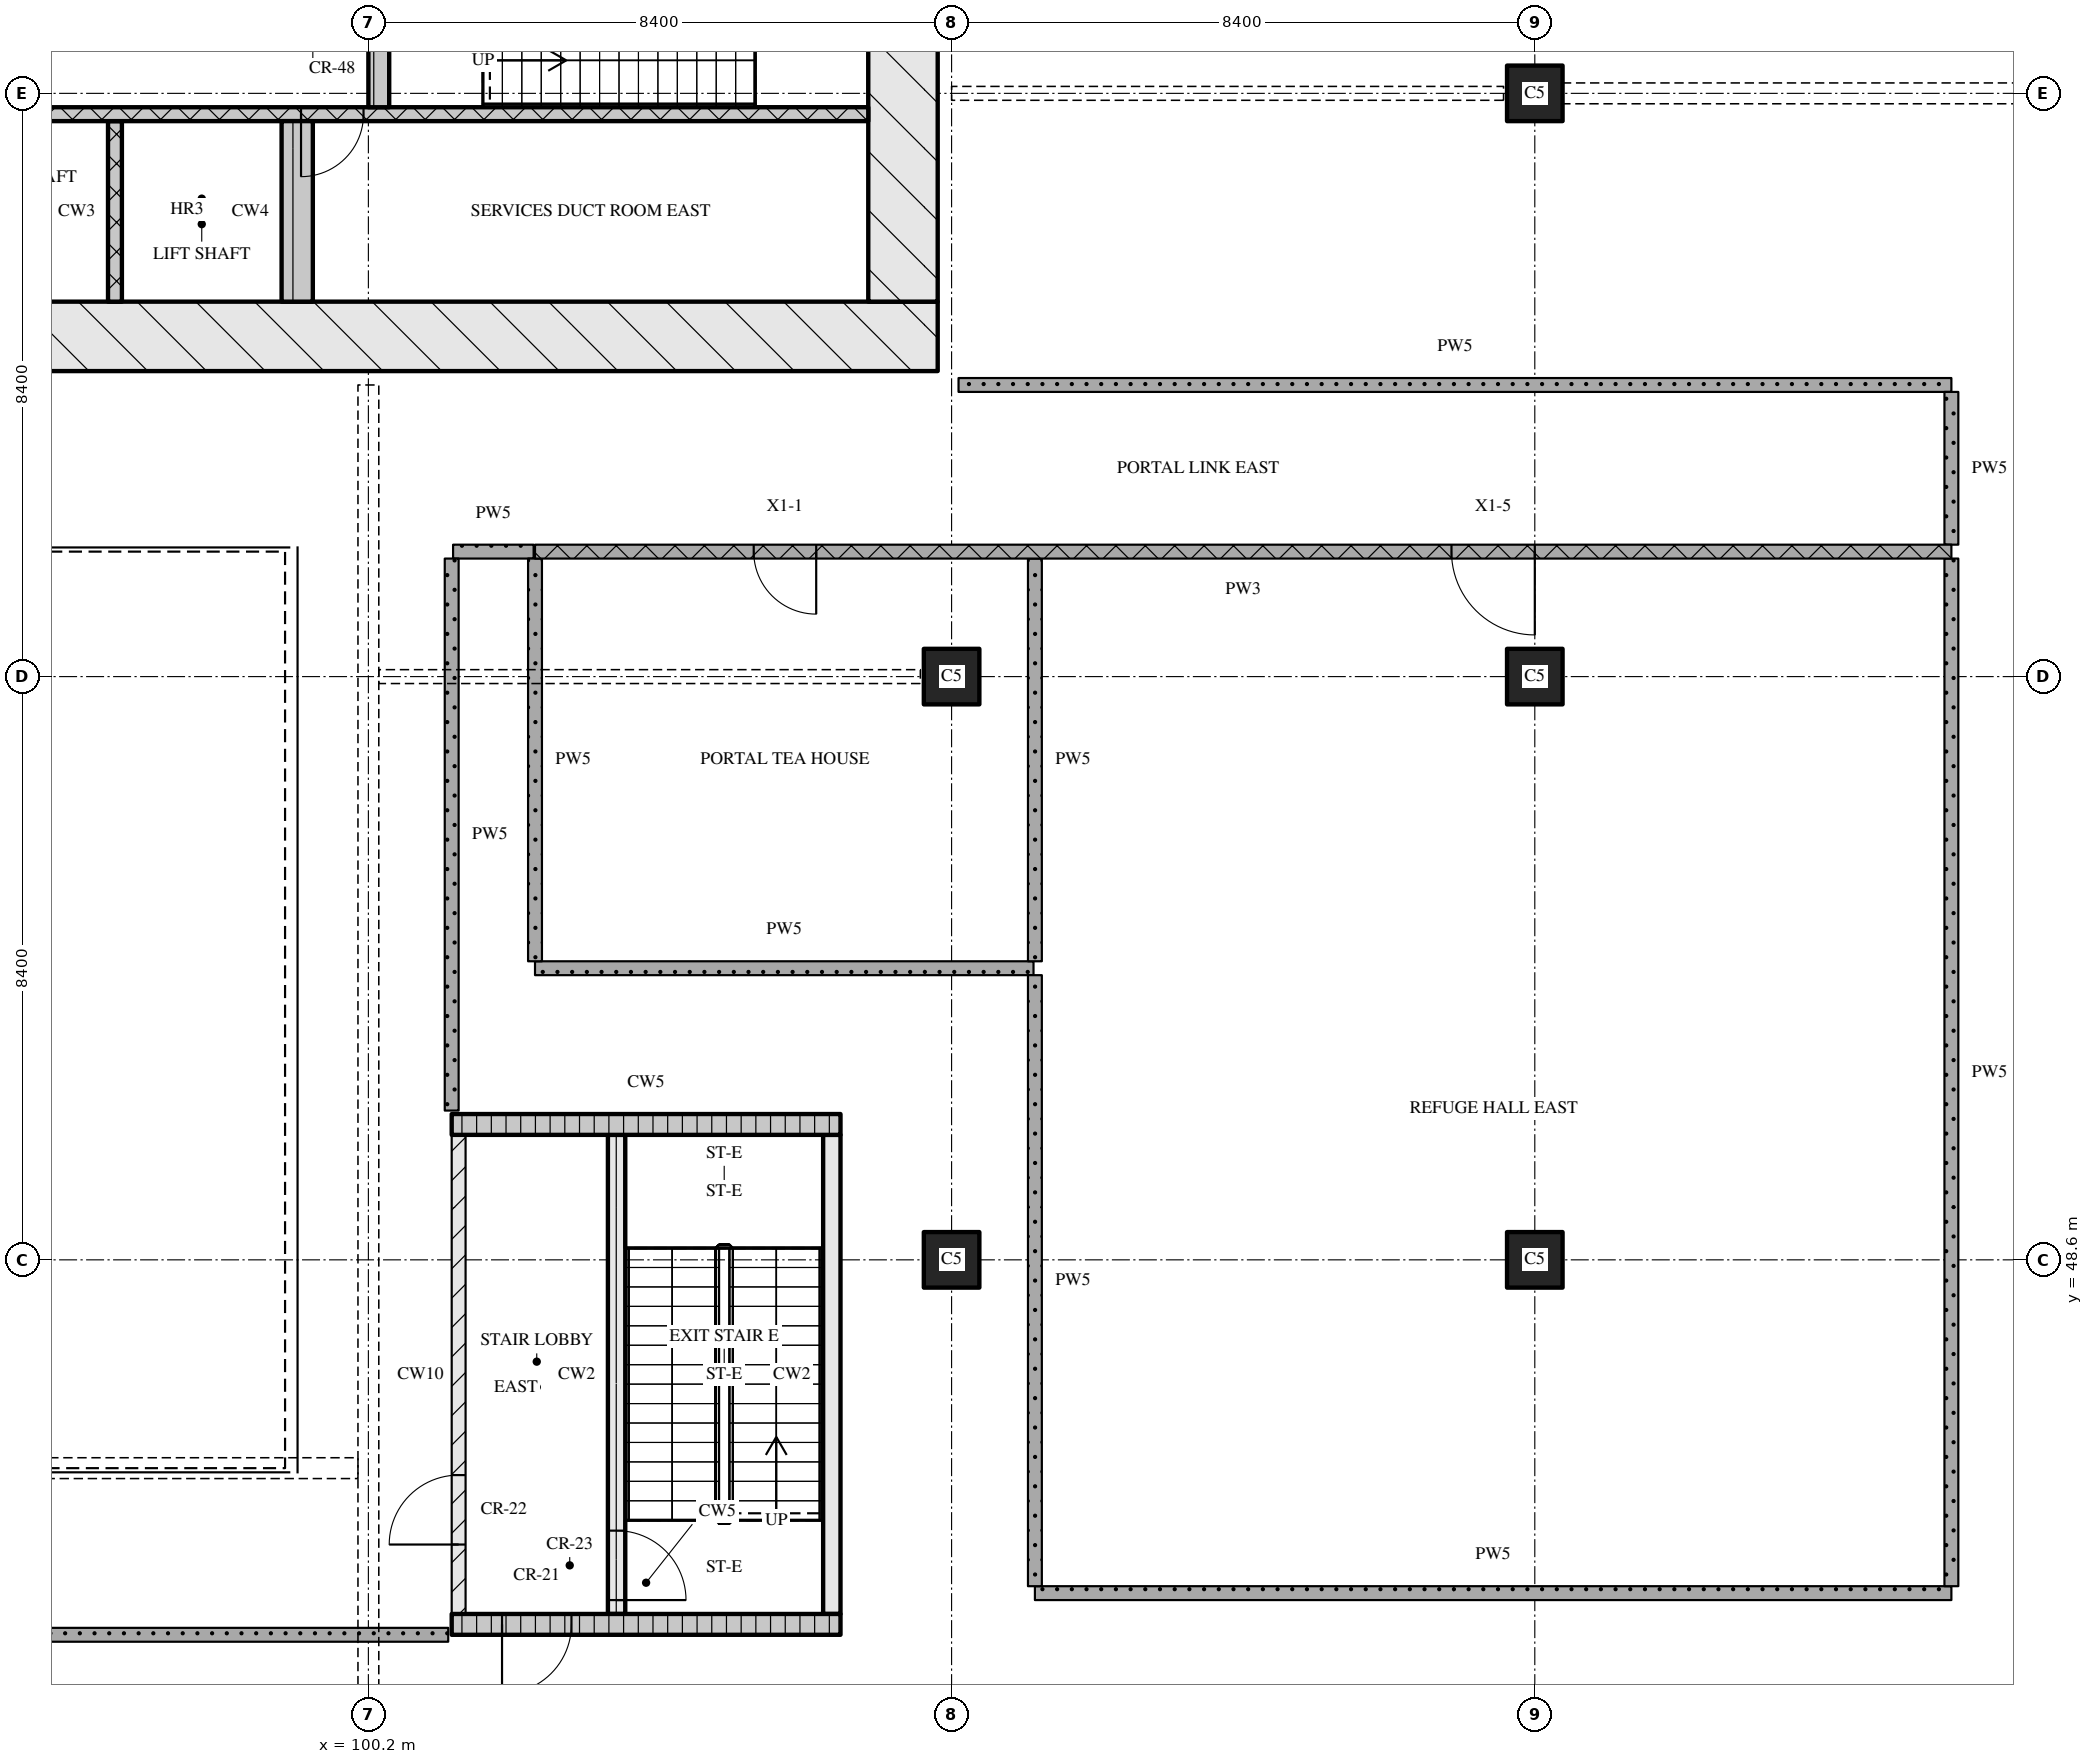
"""IFC4 building model, lengths in metres.
Left out: names, types, materials, properties, quantities, classifications, styles, units other than length and angle.
Written with IfcOpenShell. Run it as: python <this file> out.ifc"""

import sys

from ifc_helpers import new_model, si_unit, direction, frame, frame_2d, origin, origin_2d, place, context, subcontext, project, spatial, rectangle, extrude, element, fill, save


model = new_model("IFC4")
c1 = context("Model", 3, precision=1e-05, world=origin(), true_north=direction((0.0, 1.0)))
c2 = subcontext(c1, "Body", "Model", "MODEL_VIEW")
j1 = project(units=[si_unit("LENGTHUNIT", "METRE"), si_unit("PLANEANGLEUNIT", "RADIAN")], contexts=[c1])
p1 = place(None, origin())
s1 = spatial("IfcSite", under=j1, at=p1, CompositionType="ELEMENT")
p2 = place(p1, origin())
s2 = spatial("IfcBuilding", under=s1, at=p2, CompositionType="ELEMENT")
p3 = place(p2, frame((0.0, 0.0, 84.0)))
s3 = spatial("IfcBuildingStorey", under=s2, at=p3, CompositionType="ELEMENT", Elevation=84.0)
for number, where, z_axis, x_axis in (
    (1, (108.6, 48.6, 0.0), (0.0, 0.0, 1.0), (1.0, 0.0, 0.0)),
    (2, (108.6, 57.0, 0.0), (0.0, 0.0, 1.0), (1.0, 0.0, 0.0)),
    (3, (117.0, 48.6, 0.0), (0.0, 0.0, 1.0), (1.0, 0.0, 0.0)),
    (4, (117.0, 57.0, 0.0), (0.0, 0.0, 1.0), (1.0, 0.0, 0.0)),
    (5, (117.0, 65.4, 0.0), (0.0, 0.0, 1.0), (1.0, 0.0, 0.0)),
):
    element("IfcColumn", number, at=place(p3, frame(where, z_axis=z_axis, x_axis=x_axis)), inside=s3, PredefinedType="COLUMN", context=c2, shape_type="SweptSolid", body=[
        extrude(rectangle(XDim=0.8, YDim=0.8, at=origin_2d()), origin(), (0.0, 0.0, 1.0), 11.25),
    ])
p4 = place(p3, frame((66.8, 61.9, 0.0), z_axis=(0.0, 0.0, 1.0), x_axis=(1.0, 0.0, 0.0)))
e6 = element("IfcWall", 6, at=p4, inside=s3, PredefinedType="SOLIDWALL", context=c2, shape_type="SweptSolid", body=[
    extrude(rectangle(XDim=41.6, YDim=1.0, at=frame_2d((20.8, 0.0))), origin(), (0.0, 0.0, 1.0), 10.97),
])
p5 = place(p4, frame((21.15, 0.0, 0.0)))
e7 = element("IfcOpeningElement", 7, at=p5, cuts=e6, PredefinedType="OPENING", context=c2, shape_type="SweptSolid", body=[
    extrude(rectangle(XDim=1.8, YDim=2.1, at=frame_2d((0.9, 1.05))), frame((0.0, 0.51, 0.0), z_axis=(0.0, -1.0, 0.0), x_axis=(1.0, 0.0, 0.0)), (0.0, 0.0, 1.0), 1.02),
])
p6 = place(p3, frame((107.9, 62.4, 0.0), z_axis=(0.0, 0.0, 1.0), x_axis=(0.0, 1.0, 0.0)))
e8 = element("IfcWall", 8, at=p6, inside=s3, PredefinedType="SOLIDWALL", context=c2, shape_type="SweptSolid", body=[
    extrude(rectangle(XDim=12.0, YDim=1.0, at=frame_2d((6.0, 0.0))), origin(), (0.0, 0.0, 1.0), 10.97),
])
p7 = place(p6, frame((6.45, 0.0, 0.0)))
e9 = element("IfcOpeningElement", 9, at=p7, cuts=e8, PredefinedType="OPENING", context=c2, shape_type="SweptSolid", body=[
    extrude(rectangle(XDim=1.2, YDim=2.1, at=frame_2d((0.6, 1.05))), frame((0.0, 0.51, 0.0), z_axis=(0.0, -1.0, 0.0), x_axis=(1.0, 0.0, 0.0)), (0.0, 0.0, 1.0), 1.02),
])
p8 = place(p3, frame((96.55, 62.4, 0.0), z_axis=(0.0, 0.0, 1.0), x_axis=(0.0, 1.0, 0.0)))
e10 = element("IfcWall", 10, at=p8, inside=s3, PredefinedType="SOLIDWALL", context=c2, shape_type="SweptSolid", body=[
    extrude(rectangle(XDim=2.6, YDim=0.2, at=frame_2d((1.3, 0.0))), origin(), (0.0, 0.0, 1.0), 10.97),
])
p9 = place(p3, frame((99.175, 62.4, 0.0), z_axis=(0.0, 0.0, 1.0), x_axis=(0.0, 1.0, 0.0)))
e11 = element("IfcWall", 11, at=p9, inside=s3, PredefinedType="SOLIDWALL", context=c2, shape_type="SweptSolid", body=[
    extrude(rectangle(XDim=2.6, YDim=0.45, at=frame_2d((1.3, 0.0))), origin(), (0.0, 0.0, 1.0), 10.97),
])
p10 = place(p3, frame((91.4, 65.1, 0.0), z_axis=(0.0, 0.0, 1.0), x_axis=(1.0, 0.0, 0.0)))
e12 = element("IfcWall", 12, at=p10, inside=s3, PredefinedType="SOLIDWALL", context=c2, shape_type="SweptSolid", body=[
    extrude(rectangle(XDim=16.0, YDim=0.2, at=frame_2d((8.0, 0.0))), origin(), (0.0, 0.0, 1.0), 10.97),
])
p11 = place(p10, frame((7.83, 0.0, 0.0)))
e13 = element("IfcOpeningElement", 13, at=p11, cuts=e12, PredefinedType="OPENING", context=c2, shape_type="SweptSolid", body=[
    extrude(rectangle(XDim=0.9, YDim=2.1, at=frame_2d((0.45, 1.05))), frame((0.0, 0.11, 0.0), z_axis=(0.0, -1.0, 0.0), x_axis=(1.0, 0.0, 0.0)), (0.0, 0.0, 1.0), 0.22),
])
p12 = place(p3, frame((100.35, 65.2, 0.0), z_axis=(0.0, 0.0, 1.0), x_axis=(0.0, 1.0, 0.0)))
e14 = element("IfcWall", 14, at=p12, inside=s3, PredefinedType="SOLIDWALL", context=c2, shape_type="SweptSolid", body=[
    extrude(rectangle(XDim=2.85, YDim=0.3, at=frame_2d((1.425, 0.0))), origin(), (0.0, 0.0, 1.0), 10.97),
])
p13 = place(p3, frame((101.4, 43.35, 0.0), z_axis=(0.0, 0.0, 1.0), x_axis=(1.0, 0.0, 0.0)))
e15 = element("IfcWall", 15, at=p13, inside=s3, PredefinedType="SOLIDWALL", context=c2, shape_type="SweptSolid", body=[
    extrude(rectangle(XDim=5.6, YDim=0.3, at=frame_2d((2.8, 0.0))), origin(), (0.0, 0.0, 1.0), 10.97),
])
p14 = place(p13, frame((0.725, 0.0, 0.0)))
e16 = element("IfcOpeningElement", 16, at=p14, cuts=e15, PredefinedType="OPENING", context=c2, shape_type="SweptSolid", body=[
    extrude(rectangle(XDim=1.0, YDim=2.1, at=frame_2d((0.5, 1.05))), frame((0.0, 0.16, 0.0), z_axis=(0.0, -1.0, 0.0), x_axis=(1.0, 0.0, 0.0)), (0.0, 0.0, 1.0), 0.32),
])
p15 = place(p3, frame((101.5, 43.5, 0.0), z_axis=(0.0, 0.0, 1.0), x_axis=(0.0, 1.0, 0.0)))
e17 = element("IfcWall", 17, at=p15, inside=s3, PredefinedType="PARTITIONING", context=c2, shape_type="SweptSolid", body=[
    extrude(rectangle(XDim=6.9, YDim=0.2, at=frame_2d((3.45, 0.0))), origin(), (0.0, 0.0, 1.0), 10.97),
])
p16 = place(p15, frame((1.0, 0.0, 0.0)))
e18 = element("IfcOpeningElement", 18, at=p16, cuts=e17, PredefinedType="OPENING", context=c2, shape_type="SweptSolid", body=[
    extrude(rectangle(XDim=1.0, YDim=2.1, at=frame_2d((0.5, 1.05))), frame((0.0, 0.11, 0.0), z_axis=(0.0, -1.0, 0.0), x_axis=(1.0, 0.0, 0.0)), (0.0, 0.0, 1.0), 0.22),
])
p17 = place(p3, frame((103.775, 43.5, 0.0), z_axis=(0.0, 0.0, 1.0), x_axis=(0.0, 1.0, 0.0)))
e19 = element("IfcWall", 19, at=p17, inside=s3, PredefinedType="SOLIDWALL", context=c2, shape_type="SweptSolid", body=[
    extrude(rectangle(XDim=6.9, YDim=0.25, at=frame_2d((3.45, 0.0))), origin(), (0.0, 0.0, 1.0), 10.97),
])
p18 = place(p17, frame((0.2, 0.0, 0.0)))
e20 = element("IfcOpeningElement", 20, at=p18, cuts=e19, PredefinedType="OPENING", context=c2, shape_type="SweptSolid", body=[
    extrude(rectangle(XDim=1.0, YDim=2.1, at=frame_2d((0.5, 1.05))), frame((0.0, 0.135, 0.0), z_axis=(0.0, -1.0, 0.0), x_axis=(1.0, 0.0, 0.0)), (0.0, 0.0, 1.0), 0.27),
])
p19 = place(p3, frame((106.875, 43.5, 0.0), z_axis=(0.0, 0.0, 1.0), x_axis=(0.0, 1.0, 0.0)))
e21 = element("IfcWall", 21, at=p19, inside=s3, PredefinedType="SOLIDWALL", context=c2, shape_type="SweptSolid", body=[
    extrude(rectangle(XDim=6.9, YDim=0.25, at=frame_2d((3.45, 0.0))), origin(), (0.0, 0.0, 1.0), 10.97),
])
p20 = place(p3, frame((101.4, 50.55, 0.0), z_axis=(0.0, 0.0, 1.0), x_axis=(1.0, 0.0, 0.0)))
e22 = element("IfcWall", 22, at=p20, inside=s3, PredefinedType="SOLIDWALL", context=c2, shape_type="SweptSolid", body=[
    extrude(rectangle(XDim=5.6, YDim=0.3, at=frame_2d((2.8, 0.0))), origin(), (0.0, 0.0, 1.0), 10.97),
])
p21 = place(p3, frame((73.85, 43.2, 0.0), z_axis=(0.0, 0.0, 1.0), x_axis=(1.0, 0.0, 0.0)))
e23 = element("IfcWall", 23, at=p21, inside=s3, PredefinedType="PARTITIONING", context=c2, shape_type="SweptSolid", body=[
    extrude(rectangle(XDim=27.5, YDim=0.2, at=frame_2d((13.75, 0.0))), origin(), (0.0, 0.0, 1.0), 10.97),
])
p22 = place(p3, frame((109.8, 43.8, 0.0), z_axis=(0.0, 0.0, 1.0), x_axis=(1.0, 0.0, 0.0)))
e24 = element("IfcWall", 24, at=p22, inside=s3, PredefinedType="PARTITIONING", context=c2, shape_type="SweptSolid", body=[
    extrude(rectangle(XDim=13.2, YDim=0.2, at=frame_2d((6.6, 0.0))), origin(), (0.0, 0.0, 1.0), 10.97),
])
p23 = place(p3, frame((102.6, 52.8, 0.0), z_axis=(0.0, 0.0, 1.0), x_axis=(1.0, 0.0, 0.0)))
e25 = element("IfcWall", 25, at=p23, inside=s3, PredefinedType="PARTITIONING", context=c2, shape_type="SweptSolid", body=[
    extrude(rectangle(XDim=7.18, YDim=0.2, at=frame_2d((3.59, 0.0))), origin(), (0.0, 0.0, 1.0), 10.97),
])
p24 = place(p3, frame((123.0, 58.8, 0.0), z_axis=(0.0, 0.0, 1.0), x_axis=(-1.0, 0.0, 0.0)))
e26 = element("IfcWall", 26, at=p24, inside=s3, PredefinedType="PARTITIONING", context=c2, shape_type="SweptSolid", body=[
    extrude(rectangle(XDim=20.4, YDim=0.2, at=frame_2d((10.2, 0.0))), origin(), (0.0, 0.0, 1.0), 10.97),
])
p25 = place(p24, frame((6.0, 0.0, 0.0)))
e27 = element("IfcOpeningElement", 27, at=p25, cuts=e26, PredefinedType="OPENING", context=c2, shape_type="SweptSolid", body=[
    extrude(rectangle(XDim=1.2, YDim=2.1, at=frame_2d((0.6, 1.05))), frame((0.0, 0.11, 0.0), z_axis=(0.0, -1.0, 0.0), x_axis=(1.0, 0.0, 0.0)), (0.0, 0.0, 1.0), 0.22),
])
p26 = place(p24, frame((16.35, 0.0, 0.0)))
e28 = element("IfcOpeningElement", 28, at=p26, cuts=e26, PredefinedType="OPENING", context=c2, shape_type="SweptSolid", body=[
    extrude(rectangle(XDim=0.9, YDim=2.1, at=frame_2d((0.45, 1.05))), frame((0.0, 0.11, 0.0), z_axis=(0.0, -1.0, 0.0), x_axis=(1.0, 0.0, 0.0)), (0.0, 0.0, 1.0), 0.22),
])
p27 = place(p3, frame((101.42, 58.8, 0.0), z_axis=(0.0, 0.0, 1.0), x_axis=(1.0, 0.0, 0.0)))
e29 = element("IfcWall", 29, at=p27, inside=s3, PredefinedType="PARTITIONING", context=c2, shape_type="SweptSolid", body=[
    extrude(rectangle(XDim=1.16, YDim=0.2, at=frame_2d((0.58, 0.0))), origin(), (0.0, 0.0, 1.0), 10.97),
])
p28 = place(p3, frame((108.7, 61.2, 0.0), z_axis=(0.0, 0.0, 1.0), x_axis=(1.0, 0.0, 0.0)))
e30 = element("IfcWall", 30, at=p28, inside=s3, PredefinedType="PARTITIONING", context=c2, shape_type="SweptSolid", body=[
    extrude(rectangle(XDim=14.3, YDim=0.2, at=frame_2d((7.15, 0.0))), origin(), (0.0, 0.0, 1.0), 10.97),
])
p29 = place(p3, frame((101.4, 58.7, 0.0), z_axis=(0.0, 0.0, 1.0), x_axis=(0.0, -1.0, 0.0)))
e31 = element("IfcWall", 31, at=p29, inside=s3, PredefinedType="PARTITIONING", context=c2, shape_type="SweptSolid", body=[
    extrude(rectangle(XDim=7.95, YDim=0.2, at=frame_2d((3.975, 0.0))), origin(), (0.0, 0.0, 1.0), 10.97),
])
p30 = place(p3, frame((102.6, 58.7, 0.0), z_axis=(0.0, 0.0, 1.0), x_axis=(0.0, -1.0, 0.0)))
e32 = element("IfcWall", 32, at=p30, inside=s3, PredefinedType="PARTITIONING", context=c2, shape_type="SweptSolid", body=[
    extrude(rectangle(XDim=5.8, YDim=0.2, at=frame_2d((2.9, 0.0))), origin(), (0.0, 0.0, 1.0), 10.97),
])
p31 = place(p3, frame((109.8, 52.7, 0.0), z_axis=(0.0, 0.0, 1.0), x_axis=(0.0, -1.0, 0.0)))
e33 = element("IfcWall", 33, at=p31, inside=s3, PredefinedType="PARTITIONING", context=c2, shape_type="SweptSolid", body=[
    extrude(rectangle(XDim=8.8, YDim=0.2, at=frame_2d((4.4, 0.0))), origin(), (0.0, 0.0, 1.0), 10.97),
])
p32 = place(p3, frame((109.8, 58.7, 0.0), z_axis=(0.0, 0.0, 1.0), x_axis=(0.0, -1.0, 0.0)))
e34 = element("IfcWall", 34, at=p32, inside=s3, PredefinedType="PARTITIONING", context=c2, shape_type="SweptSolid", body=[
    extrude(rectangle(XDim=5.8, YDim=0.2, at=frame_2d((2.9, 0.0))), origin(), (0.0, 0.0, 1.0), 10.97),
])
p33 = place(p3, frame((123.0, 58.7, 0.0), z_axis=(0.0, 0.0, 1.0), x_axis=(0.0, -1.0, 0.0)))
e35 = element("IfcWall", 35, at=p33, inside=s3, PredefinedType="PARTITIONING", context=c2, shape_type="SweptSolid", body=[
    extrude(rectangle(XDim=14.8, YDim=0.2, at=frame_2d((7.4, 0.0))), origin(), (0.0, 0.0, 1.0), 10.97),
])
p34 = place(p3, frame((123.0, 61.1, 0.0), z_axis=(0.0, 0.0, 1.0), x_axis=(0.0, -1.0, 0.0)))
e36 = element("IfcWall", 36, at=p34, inside=s3, PredefinedType="PARTITIONING", context=c2, shape_type="SweptSolid", body=[
    extrude(rectangle(XDim=2.2, YDim=0.2, at=frame_2d((1.1, 0.0))), origin(), (0.0, 0.0, 1.0), 10.97),
])
p35 = place(p11, origin())
e37 = element("IfcDoor", 37, at=p35, inside=s3, OperationType="SINGLE_SWING_RIGHT", PredefinedType="DOOR", context=c2, shape_type="SweptSolid", body=[
    extrude(rectangle(XDim=0.9, YDim=2.1, at=frame_2d((0.45, 1.05))), frame((0.0, 0.025, 0.0), z_axis=(0.0, -1.0, 0.0), x_axis=(1.0, 0.0, 0.0)), (0.0, 0.0, 1.0), 0.05),
])
fill(e13, e37)
p36 = place(p14, origin())
e38 = element("IfcDoor", 38, at=p36, inside=s3, OperationType="SINGLE_SWING_RIGHT", PredefinedType="DOOR", context=c2, shape_type="SweptSolid", body=[
    extrude(rectangle(XDim=1.0, YDim=2.1, at=frame_2d((0.5, 1.05))), frame((0.0, 0.025, 0.0), z_axis=(0.0, -1.0, 0.0), x_axis=(1.0, 0.0, 0.0)), (0.0, 0.0, 1.0), 0.05),
])
fill(e16, e38)
p37 = place(p18, origin())
e39 = element("IfcDoor", 39, at=p37, inside=s3, OperationType="SINGLE_SWING_RIGHT", PredefinedType="DOOR", context=c2, shape_type="SweptSolid", body=[
    extrude(rectangle(XDim=1.0, YDim=2.1, at=frame_2d((0.5, 1.05))), frame((0.0, 0.025, 0.0), z_axis=(0.0, -1.0, 0.0), x_axis=(1.0, 0.0, 0.0)), (0.0, 0.0, 1.0), 0.05),
])
fill(e20, e39)
p38 = place(p16, origin())
e40 = element("IfcDoor", 40, at=p38, inside=s3, OperationType="SINGLE_SWING_LEFT", PredefinedType="DOOR", context=c2, shape_type="SweptSolid", body=[
    extrude(rectangle(XDim=1.0, YDim=2.1, at=frame_2d((0.5, 1.05))), frame((0.0, 0.025, 0.0), z_axis=(0.0, -1.0, 0.0), x_axis=(1.0, 0.0, 0.0)), (0.0, 0.0, 1.0), 0.05),
])
fill(e18, e40)
p39 = place(p25, origin())
e41 = element("IfcDoor", 41, at=p39, inside=s3, OperationType="SINGLE_SWING_LEFT", PredefinedType="DOOR", context=c2, shape_type="SweptSolid", body=[
    extrude(rectangle(XDim=1.2, YDim=2.1, at=frame_2d((0.6, 1.05))), frame((0.0, 0.025, 0.0), z_axis=(0.0, -1.0, 0.0), x_axis=(1.0, 0.0, 0.0)), (0.0, 0.0, 1.0), 0.05),
])
fill(e27, e41)
p40 = place(p26, origin())
e42 = element("IfcDoor", 42, at=p40, inside=s3, OperationType="SINGLE_SWING_LEFT", PredefinedType="DOOR", context=c2, shape_type="SweptSolid", body=[
    extrude(rectangle(XDim=0.9, YDim=2.1, at=frame_2d((0.45, 1.05))), frame((0.0, 0.025, 0.0), z_axis=(0.0, -1.0, 0.0), x_axis=(1.0, 0.0, 0.0)), (0.0, 0.0, 1.0), 0.05),
])
fill(e28, e42)
save(model, sys.argv[1])
